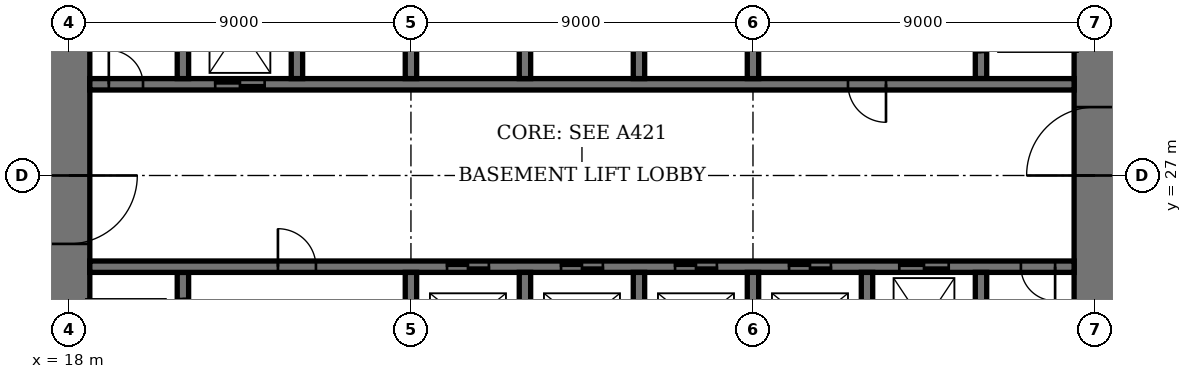
"""IFC4 building model, lengths in metres.
Left out: names, types, materials, properties, quantities, classifications, styles, units other than length and angle.
Written with IfcOpenShell. Run it as: python <this file> out.ifc"""

import sys

from ifc_helpers import new_model, si_unit, direction, frame, frame_2d, origin, place, context, subcontext, project, spatial, rectangle, extrude, element, fill, save


model = new_model("IFC4")
c1 = context("Model", 3, precision=1e-05, world=origin(), true_north=direction((0.0, 1.0)))
c2 = subcontext(c1, "Body", "Model", "MODEL_VIEW")
j1 = project(units=[si_unit("LENGTHUNIT", "METRE"), si_unit("PLANEANGLEUNIT", "RADIAN")], contexts=[c1])
p1 = place(None, origin())
s1 = spatial("IfcSite", under=j1, at=p1, CompositionType="ELEMENT")
p2 = place(p1, origin())
s2 = spatial("IfcBuilding", under=s1, at=p2, CompositionType="ELEMENT")
p3 = place(p2, frame((0.0, 0.0, -5.0)))
s3 = spatial("IfcBuildingStorey", under=s2, at=p3, CompositionType="ELEMENT", Elevation=-5.0)
p4 = place(p3, frame((18.0, 35.45, 0.0), z_axis=(0.0, 0.0, 1.0), x_axis=(0.0, -1.0, 0.0)))
e1 = element("IfcWall", 1, at=p4, inside=s3, PredefinedType="SHEAR", context=c2, shape_type="SweptSolid", body=[
    extrude(rectangle(XDim=16.9, YDim=1.1, at=frame_2d((8.45, 0.0))), origin(), (0.0, 0.0, 1.0), 5.0),
])
p5 = place(p4, frame((8.45, 0.0, 0.0)))
e2 = element("IfcOpeningElement", 2, at=p5, cuts=e1, PredefinedType="OPENING", context=c2, shape_type="SweptSolid", body=[
    extrude(rectangle(XDim=1.8, YDim=2.4, at=frame_2d((0.9, 1.2))), frame((0.0, 0.56, 0.0), z_axis=(0.0, -1.0, 0.0), x_axis=(1.0, 0.0, 0.0)), (0.0, 0.0, 1.0), 1.12),
])
p6 = place(p3, frame((45.0, 18.55, 0.0), z_axis=(0.0, 0.0, 1.0), x_axis=(0.0, 1.0, 0.0)))
e3 = element("IfcWall", 3, at=p6, inside=s3, PredefinedType="SHEAR", context=c2, shape_type="SweptSolid", body=[
    extrude(rectangle(XDim=16.9, YDim=1.1, at=frame_2d((8.45, 0.0))), origin(), (0.0, 0.0, 1.0), 5.0),
])
p7 = place(p6, frame((8.45, 0.0, 0.0)))
e4 = element("IfcOpeningElement", 4, at=p7, cuts=e3, PredefinedType="OPENING", context=c2, shape_type="SweptSolid", body=[
    extrude(rectangle(XDim=1.8, YDim=2.4, at=frame_2d((0.9, 1.2))), frame((0.0, 0.56, 0.0), z_axis=(0.0, -1.0, 0.0), x_axis=(1.0, 0.0, 0.0)), (0.0, 0.0, 1.0), 1.12),
])
p8 = place(p3, frame((21.0, 21.95, 0.0), z_axis=(0.0, 0.0, 1.0), x_axis=(0.0, 1.0, 0.0)))
e5 = element("IfcWall", 5, at=p8, inside=s3, PredefinedType="SHEAR", context=c2, shape_type="SweptSolid", body=[
    extrude(rectangle(XDim=2.5, YDim=0.3, at=frame_2d((1.25, 0.0))), origin(), (0.0, 0.0, 1.0), 5.0),
])
p9 = place(p8, frame((0.7, 0.0, 0.0)))
e6 = element("IfcOpeningElement", 6, at=p9, cuts=e5, PredefinedType="OPENING", context=c2, shape_type="SweptSolid", body=[
    extrude(rectangle(XDim=1.1, YDim=2.4, at=frame_2d((0.55, 1.2))), frame((0.0, 0.16, 0.0), z_axis=(0.0, -1.0, 0.0), x_axis=(1.0, 0.0, 0.0)), (0.0, 0.0, 1.0), 0.32),
])
p10 = place(p3, frame((42.0, 29.55, 0.0), z_axis=(0.0, 0.0, 1.0), x_axis=(0.0, 1.0, 0.0)))
e7 = element("IfcWall", 7, at=p10, inside=s3, PredefinedType="SHEAR", context=c2, shape_type="SweptSolid", body=[
    extrude(rectangle(XDim=2.5, YDim=0.3, at=frame_2d((1.25, 0.0))), origin(), (0.0, 0.0, 1.0), 5.0),
])
p11 = place(p10, frame((0.7, 0.0, 0.0)))
e8 = element("IfcOpeningElement", 8, at=p11, cuts=e7, PredefinedType="OPENING", context=c2, shape_type="SweptSolid", body=[
    extrude(rectangle(XDim=1.1, YDim=2.4, at=frame_2d((0.55, 1.2))), frame((0.0, 0.16, 0.0), z_axis=(0.0, -1.0, 0.0), x_axis=(1.0, 0.0, 0.0)), (0.0, 0.0, 1.0), 0.32),
])
p12 = place(p3, frame((18.55, 24.6, 0.0), z_axis=(0.0, 0.0, 1.0), x_axis=(1.0, 0.0, 0.0)))
e9 = element("IfcWall", 9, at=p12, inside=s3, PredefinedType="SHEAR", context=c2, shape_type="SweptSolid", body=[
    extrude(rectangle(XDim=25.9, YDim=0.3, at=frame_2d((12.95, 0.0))), origin(), (0.0, 0.0, 1.0), 5.0),
])
p13 = place(p12, frame((4.95, 0.0, 0.0)))
e10 = element("IfcOpeningElement", 10, at=p13, cuts=e9, PredefinedType="OPENING", context=c2, shape_type="SweptSolid", body=[
    extrude(rectangle(XDim=1.0, YDim=2.4, at=frame_2d((0.5, 1.2))), frame((0.0, 0.16, 0.0), z_axis=(0.0, -1.0, 0.0), x_axis=(1.0, 0.0, 0.0)), (0.0, 0.0, 1.0), 0.32),
])
p14 = place(p12, frame((24.5, 0.0, 0.0)))
e11 = element("IfcOpeningElement", 11, at=p14, cuts=e9, PredefinedType="OPENING", context=c2, shape_type="SweptSolid", body=[
    extrude(rectangle(XDim=0.9, YDim=2.1, at=frame_2d((0.45, 1.05))), frame((0.0, 0.16, 0.0), z_axis=(0.0, -1.0, 0.0), x_axis=(1.0, 0.0, 0.0)), (0.0, 0.0, 1.0), 0.32),
])
p15 = place(p12, frame((9.4, 0.0, 0.0)))
e12 = element("IfcOpeningElement", 12, at=p15, cuts=e9, PredefinedType="OPENING", context=c2, shape_type="SweptSolid", body=[
    extrude(rectangle(XDim=1.1, YDim=2.4, at=frame_2d((0.55, 1.2))), frame((0.0, 0.16, 0.0), z_axis=(0.0, -1.0, 0.0), x_axis=(1.0, 0.0, 0.0)), (0.0, 0.0, 1.0), 0.32),
])
p16 = place(p12, frame((12.4, 0.0, 0.0)))
e13 = element("IfcOpeningElement", 13, at=p16, cuts=e9, PredefinedType="OPENING", context=c2, shape_type="SweptSolid", body=[
    extrude(rectangle(XDim=1.1, YDim=2.4, at=frame_2d((0.55, 1.2))), frame((0.0, 0.16, 0.0), z_axis=(0.0, -1.0, 0.0), x_axis=(1.0, 0.0, 0.0)), (0.0, 0.0, 1.0), 0.32),
])
p17 = place(p12, frame((15.4, 0.0, 0.0)))
e14 = element("IfcOpeningElement", 14, at=p17, cuts=e9, PredefinedType="OPENING", context=c2, shape_type="SweptSolid", body=[
    extrude(rectangle(XDim=1.1, YDim=2.4, at=frame_2d((0.55, 1.2))), frame((0.0, 0.16, 0.0), z_axis=(0.0, -1.0, 0.0), x_axis=(1.0, 0.0, 0.0)), (0.0, 0.0, 1.0), 0.32),
])
p18 = place(p12, frame((18.4, 0.0, 0.0)))
e15 = element("IfcOpeningElement", 15, at=p18, cuts=e9, PredefinedType="OPENING", context=c2, shape_type="SweptSolid", body=[
    extrude(rectangle(XDim=1.1, YDim=2.4, at=frame_2d((0.55, 1.2))), frame((0.0, 0.16, 0.0), z_axis=(0.0, -1.0, 0.0), x_axis=(1.0, 0.0, 0.0)), (0.0, 0.0, 1.0), 0.32),
])
p19 = place(p12, frame((21.3, 0.0, 0.0)))
e16 = element("IfcOpeningElement", 16, at=p19, cuts=e9, PredefinedType="OPENING", context=c2, shape_type="SweptSolid", body=[
    extrude(rectangle(XDim=1.3, YDim=2.4, at=frame_2d((0.65, 1.2))), frame((0.0, 0.16, 0.0), z_axis=(0.0, -1.0, 0.0), x_axis=(1.0, 0.0, 0.0)), (0.0, 0.0, 1.0), 0.32),
])
p20 = place(p3, frame((18.55, 29.4, 0.0), z_axis=(0.0, 0.0, 1.0), x_axis=(1.0, 0.0, 0.0)))
e17 = element("IfcWall", 17, at=p20, inside=s3, PredefinedType="SHEAR", context=c2, shape_type="SweptSolid", body=[
    extrude(rectangle(XDim=25.9, YDim=0.3, at=frame_2d((12.95, 0.0))), origin(), (0.0, 0.0, 1.0), 5.0),
])
p21 = place(p20, frame((19.95, 0.0, 0.0)))
e18 = element("IfcOpeningElement", 18, at=p21, cuts=e17, PredefinedType="OPENING", context=c2, shape_type="SweptSolid", body=[
    extrude(rectangle(XDim=1.0, YDim=2.4, at=frame_2d((0.5, 1.2))), frame((0.0, 0.16, 0.0), z_axis=(0.0, -1.0, 0.0), x_axis=(1.0, 0.0, 0.0)), (0.0, 0.0, 1.0), 0.32),
])
p22 = place(p20, frame((0.5, 0.0, 0.0)))
e19 = element("IfcOpeningElement", 19, at=p22, cuts=e17, PredefinedType="OPENING", context=c2, shape_type="SweptSolid", body=[
    extrude(rectangle(XDim=0.9, YDim=2.1, at=frame_2d((0.45, 1.05))), frame((0.0, 0.16, 0.0), z_axis=(0.0, -1.0, 0.0), x_axis=(1.0, 0.0, 0.0)), (0.0, 0.0, 1.0), 0.32),
])
p23 = place(p20, frame((3.3, 0.0, 0.0)))
e20 = element("IfcOpeningElement", 20, at=p23, cuts=e17, PredefinedType="OPENING", context=c2, shape_type="SweptSolid", body=[
    extrude(rectangle(XDim=1.3, YDim=2.4, at=frame_2d((0.65, 1.2))), frame((0.0, 0.16, 0.0), z_axis=(0.0, -1.0, 0.0), x_axis=(1.0, 0.0, 0.0)), (0.0, 0.0, 1.0), 0.32),
])
for number, where, z_axis, x_axis in (
    (21, (30.0, 21.75, 0.0), (0.0, 0.0, 1.0), (0.0, 1.0, 0.0)),
    (22, (33.0, 29.55, 0.0), (0.0, 0.0, 1.0), (0.0, 1.0, 0.0)),
    (23, (33.0, 21.75, 0.0), (0.0, 0.0, 1.0), (0.0, 1.0, 0.0)),
    (24, (30.0, 29.55, 0.0), (0.0, 0.0, 1.0), (0.0, 1.0, 0.0)),
    (25, (36.0, 21.75, 0.0), (0.0, 0.0, 1.0), (0.0, 1.0, 0.0)),
    (26, (27.0, 29.55, 0.0), (0.0, 0.0, 1.0), (0.0, 1.0, 0.0)),
):
    element("IfcWall", number, at=place(p3, frame(where, z_axis=z_axis, x_axis=x_axis)), inside=s3, PredefinedType="SHEAR", context=c2, shape_type="SweptSolid", body=[
        extrude(rectangle(XDim=2.7, YDim=0.3, at=frame_2d((1.35, 0.0))), origin(), (0.0, 0.0, 1.0), 5.0),
    ])
for number, where, z_axis, x_axis in (
    (27, (39.0, 18.55, 0.0), (0.0, 0.0, 1.0), (0.0, 1.0, 0.0)),
    (28, (24.0, 29.55, 0.0), (0.0, 0.0, 1.0), (0.0, 1.0, 0.0)),
):
    element("IfcWall", number, at=place(p3, frame(where, z_axis=z_axis, x_axis=x_axis)), inside=s3, PredefinedType="SHEAR", context=c2, shape_type="SweptSolid", body=[
        extrude(rectangle(XDim=5.9, YDim=0.3, at=frame_2d((2.95, 0.0))), origin(), (0.0, 0.0, 1.0), 5.0),
    ])
for number, where, z_axis, x_axis in (
    (29, (42.0, 21.75, 0.0), (0.0, 0.0, 1.0), (0.0, 1.0, 0.0)),
    (30, (21.0, 29.55, 0.0), (0.0, 0.0, 1.0), (0.0, 1.0, 0.0)),
):
    element("IfcWall", number, at=place(p3, frame(where, z_axis=z_axis, x_axis=x_axis)), inside=s3, PredefinedType="SHEAR", context=c2, shape_type="SweptSolid", body=[
        extrude(rectangle(XDim=2.7, YDim=0.3, at=frame_2d((1.35, 0.0))), origin(), (0.0, 0.0, 1.0), 5.0),
    ])
for number, where, z_axis, x_axis in (
    (31, (27.0, 21.6, 0.0), (0.0, 0.0, 1.0), (0.0, 1.0, 0.0)),
    (32, (36.0, 29.55, 0.0), (0.0, 0.0, 1.0), (0.0, 1.0, 0.0)),
):
    element("IfcWall", number, at=place(p3, frame(where, z_axis=z_axis, x_axis=x_axis)), inside=s3, PredefinedType="SHEAR", context=c2, shape_type="SweptSolid", body=[
        extrude(rectangle(XDim=2.85, YDim=0.3, at=frame_2d((1.425, 0.0))), origin(), (0.0, 0.0, 1.0), 5.0),
    ])
p24 = place(p5, origin())
e33 = element("IfcDoor", 33, at=p24, inside=s3, OperationType="DOUBLE_DOOR_DOUBLE_SWING", PredefinedType="DOOR", context=c2, shape_type="SweptSolid", body=[
    extrude(rectangle(XDim=1.8, YDim=2.4, at=frame_2d((0.9, 1.2))), frame((0.0, 0.03, 0.0), z_axis=(0.0, -1.0, 0.0), x_axis=(1.0, 0.0, 0.0)), (0.0, 0.0, 1.0), 0.06),
    extrude(rectangle(XDim=0.04, YDim=2.4, at=frame_2d((0.02, 1.2))), frame((0.0, 0.55, 0.0), z_axis=(0.0, -1.0, 0.0), x_axis=(1.0, 0.0, 0.0)), (0.0, 0.0, 1.0), 1.1),
    extrude(rectangle(XDim=0.04, YDim=2.4, at=frame_2d((1.78, 1.2))), frame((0.0, 0.55, 0.0), z_axis=(0.0, -1.0, 0.0), x_axis=(1.0, 0.0, 0.0)), (0.0, 0.0, 1.0), 1.1),
    extrude(rectangle(XDim=1.8, YDim=0.04, at=frame_2d((0.9, 2.38))), frame((0.0, 0.55, 0.0), z_axis=(0.0, -1.0, 0.0), x_axis=(1.0, 0.0, 0.0)), (0.0, 0.0, 1.0), 1.1),
])
fill(e2, e33)
p25 = place(p7, origin())
e34 = element("IfcDoor", 34, at=p25, inside=s3, OperationType="DOUBLE_DOOR_DOUBLE_SWING", PredefinedType="DOOR", context=c2, shape_type="SweptSolid", body=[
    extrude(rectangle(XDim=1.8, YDim=2.4, at=frame_2d((0.9, 1.2))), frame((0.0, 0.03, 0.0), z_axis=(0.0, -1.0, 0.0), x_axis=(1.0, 0.0, 0.0)), (0.0, 0.0, 1.0), 0.06),
    extrude(rectangle(XDim=0.04, YDim=2.4, at=frame_2d((0.02, 1.2))), frame((0.0, 0.55, 0.0), z_axis=(0.0, -1.0, 0.0), x_axis=(1.0, 0.0, 0.0)), (0.0, 0.0, 1.0), 1.1),
    extrude(rectangle(XDim=0.04, YDim=2.4, at=frame_2d((1.78, 1.2))), frame((0.0, 0.55, 0.0), z_axis=(0.0, -1.0, 0.0), x_axis=(1.0, 0.0, 0.0)), (0.0, 0.0, 1.0), 1.1),
    extrude(rectangle(XDim=1.8, YDim=0.04, at=frame_2d((0.9, 2.38))), frame((0.0, 0.55, 0.0), z_axis=(0.0, -1.0, 0.0), x_axis=(1.0, 0.0, 0.0)), (0.0, 0.0, 1.0), 1.1),
])
fill(e4, e34)
p26 = place(p13, origin())
e35 = element("IfcDoor", 35, at=p26, inside=s3, OperationType="SINGLE_SWING_RIGHT", PredefinedType="DOOR", context=c2, shape_type="SweptSolid", body=[
    extrude(rectangle(XDim=1.0, YDim=2.4, at=frame_2d((0.5, 1.2))), frame((0.0, 0.03, 0.0), z_axis=(0.0, -1.0, 0.0), x_axis=(1.0, 0.0, 0.0)), (0.0, 0.0, 1.0), 0.06),
])
fill(e10, e35)
p27 = place(p21, origin())
e36 = element("IfcDoor", 36, at=p27, inside=s3, OperationType="SINGLE_SWING_RIGHT", PredefinedType="DOOR", context=c2, shape_type="SweptSolid", body=[
    extrude(rectangle(XDim=1.0, YDim=2.4, at=frame_2d((0.5, 1.2))), frame((0.0, 0.03, 0.0), z_axis=(0.0, -1.0, 0.0), x_axis=(1.0, 0.0, 0.0)), (0.0, 0.0, 1.0), 0.06),
])
fill(e18, e36)
p28 = place(p14, origin())
e37 = element("IfcDoor", 37, at=p28, inside=s3, OperationType="SINGLE_SWING_RIGHT", PredefinedType="DOOR", context=c2, shape_type="SweptSolid", body=[
    extrude(rectangle(XDim=0.9, YDim=2.1, at=frame_2d((0.45, 1.05))), frame((0.0, 0.03, 0.0), z_axis=(0.0, -1.0, 0.0), x_axis=(1.0, 0.0, 0.0)), (0.0, 0.0, 1.0), 0.06),
])
fill(e11, e37)
p29 = place(p22, origin())
e38 = element("IfcDoor", 38, at=p29, inside=s3, OperationType="SINGLE_SWING_RIGHT", PredefinedType="DOOR", context=c2, shape_type="SweptSolid", body=[
    extrude(rectangle(XDim=0.9, YDim=2.1, at=frame_2d((0.45, 1.05))), frame((0.0, 0.03, 0.0), z_axis=(0.0, -1.0, 0.0), x_axis=(1.0, 0.0, 0.0)), (0.0, 0.0, 1.0), 0.06),
])
fill(e19, e38)
p30 = place(p15, origin())
e39 = element("IfcDoor", 39, at=p30, inside=s3, OperationType="DOUBLE_DOOR_SLIDING", PredefinedType="DOOR", context=c2, shape_type="SweptSolid", body=[
    extrude(rectangle(XDim=1.1, YDim=2.4, at=frame_2d((0.55, 1.2))), frame((0.0, 0.02, 0.0), z_axis=(0.0, -1.0, 0.0), x_axis=(1.0, 0.0, 0.0)), (0.0, 0.0, 1.0), 0.04),
])
fill(e12, e39)
p31 = place(p16, origin())
e40 = element("IfcDoor", 40, at=p31, inside=s3, OperationType="DOUBLE_DOOR_SLIDING", PredefinedType="DOOR", context=c2, shape_type="SweptSolid", body=[
    extrude(rectangle(XDim=1.1, YDim=2.4, at=frame_2d((0.55, 1.2))), frame((0.0, 0.02, 0.0), z_axis=(0.0, -1.0, 0.0), x_axis=(1.0, 0.0, 0.0)), (0.0, 0.0, 1.0), 0.04),
])
fill(e13, e40)
p32 = place(p17, origin())
e41 = element("IfcDoor", 41, at=p32, inside=s3, OperationType="DOUBLE_DOOR_SLIDING", PredefinedType="DOOR", context=c2, shape_type="SweptSolid", body=[
    extrude(rectangle(XDim=1.1, YDim=2.4, at=frame_2d((0.55, 1.2))), frame((0.0, 0.02, 0.0), z_axis=(0.0, -1.0, 0.0), x_axis=(1.0, 0.0, 0.0)), (0.0, 0.0, 1.0), 0.04),
])
fill(e14, e41)
p33 = place(p18, origin())
e42 = element("IfcDoor", 42, at=p33, inside=s3, OperationType="DOUBLE_DOOR_SLIDING", PredefinedType="DOOR", context=c2, shape_type="SweptSolid", body=[
    extrude(rectangle(XDim=1.1, YDim=2.4, at=frame_2d((0.55, 1.2))), frame((0.0, 0.02, 0.0), z_axis=(0.0, -1.0, 0.0), x_axis=(1.0, 0.0, 0.0)), (0.0, 0.0, 1.0), 0.04),
])
fill(e15, e42)
p34 = place(p19, origin())
e43 = element("IfcDoor", 43, at=p34, inside=s3, OperationType="DOUBLE_DOOR_SLIDING", PredefinedType="DOOR", context=c2, shape_type="SweptSolid", body=[
    extrude(rectangle(XDim=1.3, YDim=2.4, at=frame_2d((0.65, 1.2))), frame((0.0, 0.02, 0.0), z_axis=(0.0, -1.0, 0.0), x_axis=(1.0, 0.0, 0.0)), (0.0, 0.0, 1.0), 0.04),
])
fill(e16, e43)
p35 = place(p23, origin())
e44 = element("IfcDoor", 44, at=p35, inside=s3, OperationType="DOUBLE_DOOR_SLIDING", PredefinedType="DOOR", context=c2, shape_type="SweptSolid", body=[
    extrude(rectangle(XDim=1.3, YDim=2.4, at=frame_2d((0.65, 1.2))), frame((0.0, 0.02, 0.0), z_axis=(0.0, -1.0, 0.0), x_axis=(1.0, 0.0, 0.0)), (0.0, 0.0, 1.0), 0.04),
])
fill(e20, e44)
save(model, sys.argv[1])
